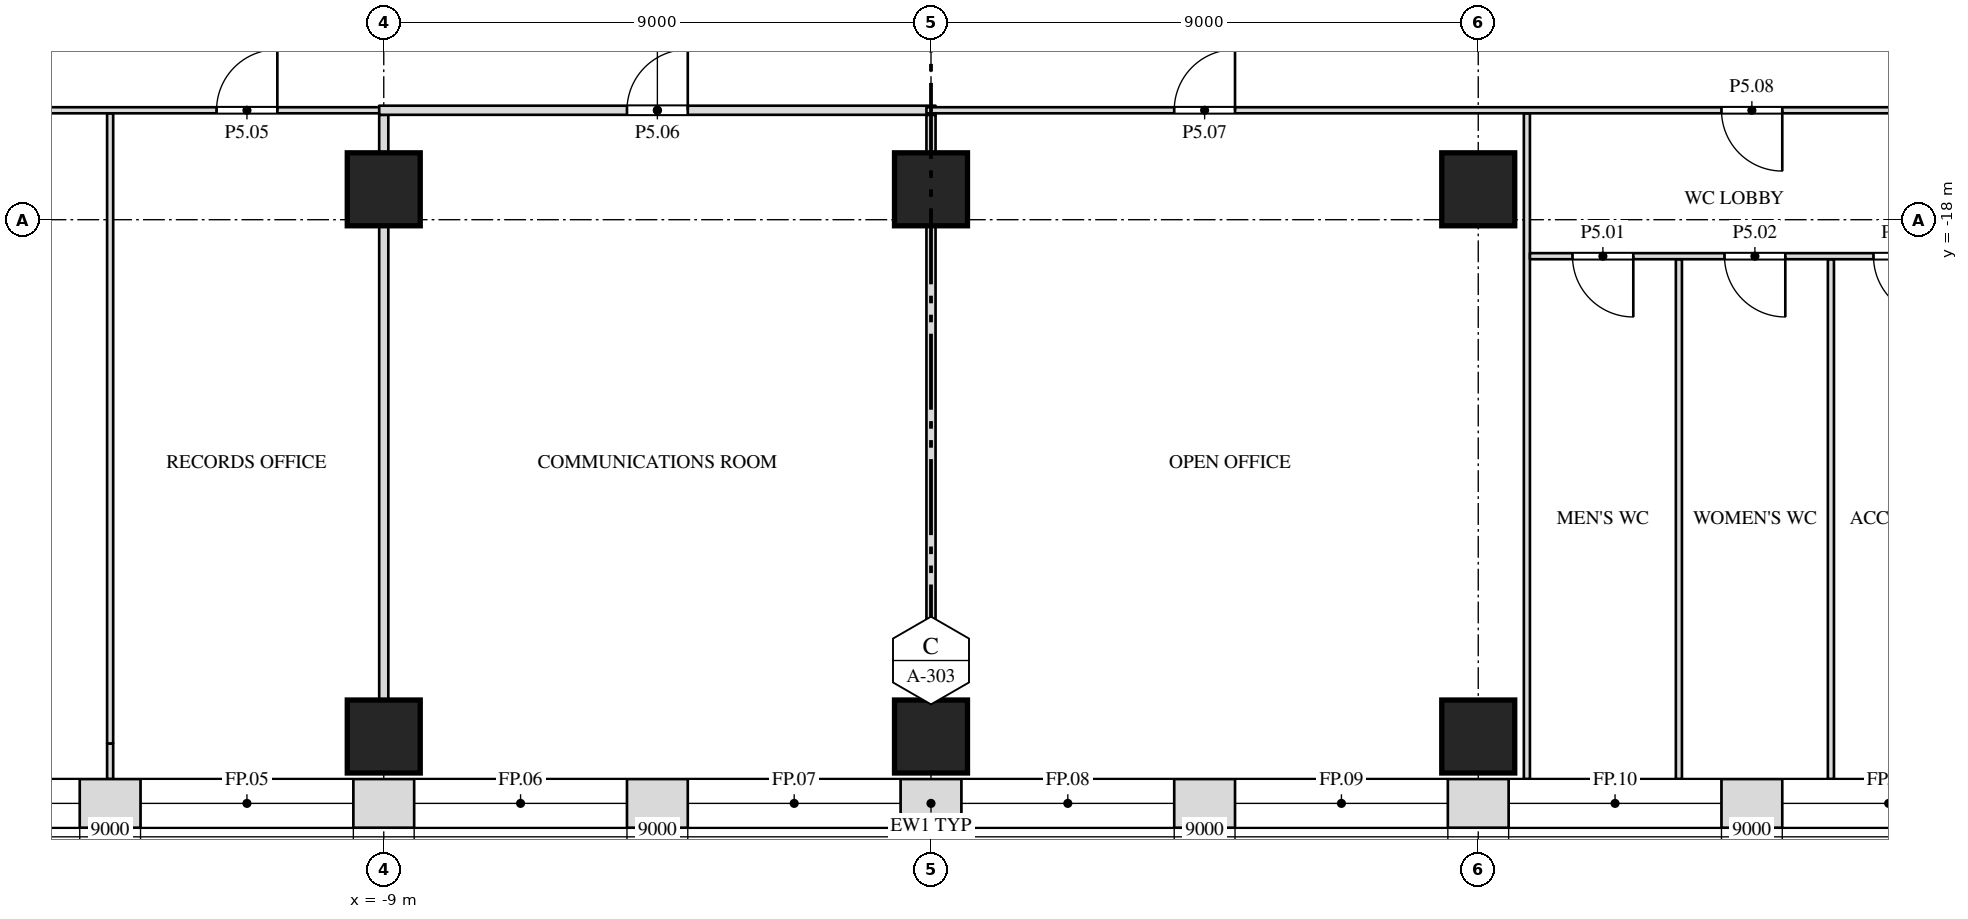
"""IFC4 building model, lengths in metres.
Left out: names, types, materials, properties, quantities, classifications, styles, units other than length and angle.
Written with IfcOpenShell. Run it as: python <this file> out.ifc"""

import sys

from ifc_helpers import new_model, si_unit, direction, frame, frame_2d, origin, origin_2d, place, context, subcontext, project, spatial, rectangle, extrude, element, fill, save


model = new_model("IFC4")
c1 = context("Model", 3, precision=1e-05, world=origin(), true_north=direction((0.0, 1.0)))
c2 = subcontext(c1, "Body", "Model", "MODEL_VIEW")
j1 = project(units=[si_unit("LENGTHUNIT", "METRE"), si_unit("PLANEANGLEUNIT", "RADIAN")], contexts=[c1])
p1 = place(None, origin())
s1 = spatial("IfcSite", under=j1, at=p1, CompositionType="ELEMENT")
p2 = place(p1, origin())
s2 = spatial("IfcBuilding", under=s1, at=p2, CompositionType="ELEMENT")
p3 = place(p2, frame((0.0, 0.0, 33.0)))
s3 = spatial("IfcBuildingStorey", under=s2, at=p3, CompositionType="ELEMENT", Elevation=33.0)
for number, where, z_axis, x_axis in (
    (1, (-9.0, -26.5, 0.0), (0.0, 0.0, 1.0), (1.0, 0.0, 0.0)),
    (2, (0.0, -26.5, 0.0), (0.0, 0.0, 1.0), (1.0, 0.0, 0.0)),
    (3, (9.0, -26.5, 0.0), (0.0, 0.0, 1.0), (1.0, 0.0, 0.0)),
    (4, (-9.0, -17.5, 0.0), (0.0, 0.0, 1.0), (1.0, 0.0, 0.0)),
    (5, (0.0, -17.5, 0.0), (0.0, 0.0, 1.0), (1.0, 0.0, 0.0)),
    (6, (9.0, -17.5, 0.0), (0.0, 0.0, 1.0), (1.0, 0.0, 0.0)),
):
    element("IfcColumn", number, at=place(p3, frame(where, z_axis=z_axis, x_axis=x_axis)), inside=s3, PredefinedType="COLUMN", context=c2, shape_type="SweptSolid", body=[
        extrude(rectangle(XDim=1.2, YDim=1.2, at=origin_2d()), origin(), (0.0, 0.0, 1.0), 6.0),
    ])
p4 = place(p3, frame((-13.5, -27.2, 0.0), z_axis=(0.0, 0.0, 1.0), x_axis=(0.0, 1.0, 0.0)))
e7 = element("IfcWall", 7, at=p4, inside=s3, PredefinedType="PARTITIONING", context=c2, shape_type="SweptSolid", body=[
    extrude(rectangle(XDim=0.585, YDim=0.1, at=frame_2d((0.293, 0.0))), origin(), (0.0, 0.0, 1.0), 5.75),
])
p5 = place(p3, frame((-13.5, -26.615, 0.0), z_axis=(0.0, 0.0, 1.0), x_axis=(0.0, 1.0, 0.0)))
e8 = element("IfcWall", 8, at=p5, inside=s3, PredefinedType="PARTITIONING", context=c2, shape_type="SweptSolid", body=[
    extrude(rectangle(XDim=10.365, YDim=0.1, at=frame_2d((5.182, 0.0))), origin(), (0.0, 0.0, 1.0), 5.138),
])
p6 = place(p3, frame((-9.0, -25.9, 0.0), z_axis=(0.0, 0.0, 1.0), x_axis=(0.0, 1.0, 0.0)))
e9 = element("IfcWall", 9, at=p6, inside=s3, PredefinedType="PARTITIONING", context=c2, shape_type="SweptSolid", body=[
    extrude(rectangle(XDim=7.8, YDim=0.15, at=frame_2d((3.9, 0.0))), origin(), (0.0, 0.0, 1.0), 5.138),
])
p7 = place(p3, frame((-9.0, -16.9, 0.0), z_axis=(0.0, 0.0, 1.0), x_axis=(0.0, 1.0, 0.0)))
e10 = element("IfcWall", 10, at=p7, inside=s3, PredefinedType="PARTITIONING", context=c2, shape_type="SweptSolid", body=[
    extrude(rectangle(XDim=0.625, YDim=0.15, at=frame_2d((0.312, 0.0))), origin(), (0.0, 0.0, 1.0), 5.75),
])
p8 = place(p3, frame((0.0, -25.9, 0.0), z_axis=(0.0, 0.0, 1.0), x_axis=(0.0, 1.0, 0.0)))
e11 = element("IfcWall", 11, at=p8, inside=s3, PredefinedType="PARTITIONING", context=c2, shape_type="SweptSolid", body=[
    extrude(rectangle(XDim=7.8, YDim=0.15, at=frame_2d((3.9, 0.0))), origin(), (0.0, 0.0, 1.0), 5.138),
])
p9 = place(p3, frame((0.0, -16.9, 0.0), z_axis=(0.0, 0.0, 1.0), x_axis=(0.0, 1.0, 0.0)))
e12 = element("IfcWall", 12, at=p9, inside=s3, PredefinedType="PARTITIONING", context=c2, shape_type="SweptSolid", body=[
    extrude(rectangle(XDim=0.625, YDim=0.15, at=frame_2d((0.312, 0.0))), origin(), (0.0, 0.0, 1.0), 5.75),
])
p10 = place(p3, frame((9.8, -27.2, 0.0), z_axis=(0.0, 0.0, 1.0), x_axis=(0.0, 1.0, 0.0)))
e13 = element("IfcWall", 13, at=p10, inside=s3, PredefinedType="PARTITIONING", context=c2, shape_type="SweptSolid", body=[
    extrude(rectangle(XDim=10.95, YDim=0.1, at=frame_2d((5.475, 0.0))), origin(), (0.0, 0.0, 1.0), 5.75),
])
for number, where, z_axis, x_axis in (
    (14, (12.3, -27.2, 0.0), (0.0, 0.0, 1.0), (0.0, 1.0, 0.0)),
    (15, (14.8, -27.2, 0.0), (0.0, 0.0, 1.0), (0.0, 1.0, 0.0)),
):
    element("IfcWall", number, at=place(p3, frame(where, z_axis=z_axis, x_axis=x_axis)), inside=s3, PredefinedType="PARTITIONING", context=c2, shape_type="SweptSolid", body=[
        extrude(rectangle(XDim=8.55, YDim=0.1, at=frame_2d((4.275, 0.0))), origin(), (0.0, 0.0, 1.0), 5.75),
    ])
p11 = place(p3, frame((9.85, -18.6, 0.0), z_axis=(0.0, 0.0, 1.0), x_axis=(1.0, 0.0, 0.0)))
e16 = element("IfcWall", 16, at=p11, inside=s3, PredefinedType="PARTITIONING", context=c2, shape_type="SweptSolid", body=[
    extrude(rectangle(XDim=7.25, YDim=0.1, at=frame_2d((3.625, 0.0))), origin(), (0.0, 0.0, 1.0), 5.75),
])
p12 = place(p11, frame((0.7, 0.0, 0.0)))
e17 = element("IfcOpeningElement", 17, at=p12, cuts=e16, PredefinedType="OPENING", context=c2, shape_type="SweptSolid", body=[
    extrude(rectangle(XDim=1.0, YDim=2.1, at=frame_2d((0.5, 1.05))), frame((0.0, 0.062, 0.0), z_axis=(0.0, -1.0, 0.0), x_axis=(1.0, 0.0, 0.0)), (0.0, 0.0, 1.0), 0.124),
])
p13 = place(p11, frame((3.2, 0.0, 0.0)))
e18 = element("IfcOpeningElement", 18, at=p13, cuts=e16, PredefinedType="OPENING", context=c2, shape_type="SweptSolid", body=[
    extrude(rectangle(XDim=1.0, YDim=2.1, at=frame_2d((0.5, 1.05))), frame((0.0, 0.062, 0.0), z_axis=(0.0, -1.0, 0.0), x_axis=(1.0, 0.0, 0.0)), (0.0, 0.0, 1.0), 0.124),
])
p14 = place(p11, frame((5.65, 0.0, 0.0)))
e19 = element("IfcOpeningElement", 19, at=p14, cuts=e16, PredefinedType="OPENING", context=c2, shape_type="SweptSolid", body=[
    extrude(rectangle(XDim=1.0, YDim=2.1, at=frame_2d((0.5, 1.05))), frame((0.0, 0.062, 0.0), z_axis=(0.0, -1.0, 0.0), x_axis=(1.0, 0.0, 0.0)), (0.0, 0.0, 1.0), 0.124),
])
p15 = place(p3, frame((-26.95, -16.2, 0.0), z_axis=(0.0, 0.0, 1.0), x_axis=(1.0, 0.0, 0.0)))
e20 = element("IfcWall", 20, at=p15, inside=s3, PredefinedType="PARTITIONING", context=c2, shape_type="SweptSolid", body=[
    extrude(rectangle(XDim=18.025, YDim=0.1, at=frame_2d((9.012, 0.0))), origin(), (0.0, 0.0, 1.0), 5.75),
])
p16 = place(p15, frame((6.2, 0.0, 0.0)))
e21 = element("IfcOpeningElement", 21, at=p16, cuts=e20, PredefinedType="OPENING", context=c2, shape_type="SweptSolid", body=[
    extrude(rectangle(XDim=1.0, YDim=2.1, at=frame_2d((0.5, 1.05))), frame((0.0, 0.062, 0.0), z_axis=(0.0, -1.0, 0.0), x_axis=(1.0, 0.0, 0.0)), (0.0, 0.0, 1.0), 0.124),
])
p17 = place(p15, frame((15.2, 0.0, 0.0)))
e22 = element("IfcOpeningElement", 22, at=p17, cuts=e20, PredefinedType="OPENING", context=c2, shape_type="SweptSolid", body=[
    extrude(rectangle(XDim=1.0, YDim=2.1, at=frame_2d((0.5, 1.05))), frame((0.0, 0.062, 0.0), z_axis=(0.0, -1.0, 0.0), x_axis=(1.0, 0.0, 0.0)), (0.0, 0.0, 1.0), 0.124),
])
p18 = place(p3, frame((-9.075, -16.2, 0.0), z_axis=(0.0, 0.0, 1.0), x_axis=(1.0, 0.0, 0.0)))
e23 = element("IfcWall", 23, at=p18, inside=s3, PredefinedType="PARTITIONING", context=c2, shape_type="SweptSolid", body=[
    extrude(rectangle(XDim=9.15, YDim=0.15, at=frame_2d((4.575, 0.0))), origin(), (0.0, 0.0, 1.0), 5.75),
])
p19 = place(p18, frame((4.075, 0.0, 0.0)))
e24 = element("IfcOpeningElement", 24, at=p19, cuts=e23, PredefinedType="OPENING", context=c2, shape_type="SweptSolid", body=[
    extrude(rectangle(XDim=1.0, YDim=2.1, at=frame_2d((0.5, 1.05))), frame((0.0, 0.087, 0.0), z_axis=(0.0, -1.0, 0.0), x_axis=(1.0, 0.0, 0.0)), (0.0, 0.0, 1.0), 0.174),
])
p20 = place(p3, frame((-0.075, -16.2, 0.0), z_axis=(0.0, 0.0, 1.0), x_axis=(1.0, 0.0, 0.0)))
e25 = element("IfcWall", 25, at=p20, inside=s3, PredefinedType="PARTITIONING", context=c2, shape_type="SweptSolid", body=[
    extrude(rectangle(XDim=17.375, YDim=0.1, at=frame_2d((8.688, 0.0))), origin(), (0.0, 0.0, 1.0), 5.75),
])
p21 = place(p20, frame((4.075, 0.0, 0.0)))
e26 = element("IfcOpeningElement", 26, at=p21, cuts=e25, PredefinedType="OPENING", context=c2, shape_type="SweptSolid", body=[
    extrude(rectangle(XDim=1.0, YDim=2.1, at=frame_2d((0.5, 1.05))), frame((0.0, 0.062, 0.0), z_axis=(0.0, -1.0, 0.0), x_axis=(1.0, 0.0, 0.0)), (0.0, 0.0, 1.0), 0.124),
])
p22 = place(p20, frame((13.075, 0.0, 0.0)))
e27 = element("IfcOpeningElement", 27, at=p22, cuts=e25, PredefinedType="OPENING", context=c2, shape_type="SweptSolid", body=[
    extrude(rectangle(XDim=1.0, YDim=2.1, at=frame_2d((0.5, 1.05))), frame((0.0, 0.062, 0.0), z_axis=(0.0, -1.0, 0.0), x_axis=(1.0, 0.0, 0.0)), (0.0, 0.0, 1.0), 0.124),
])
p23 = place(p3, frame((-32.948, -27.6, 0.0), z_axis=(0.0, 0.0, 1.0), x_axis=(1.0, 0.0, 0.0)))
e28 = element("IfcWall", 28, at=p23, inside=s3, PredefinedType="SOLIDWALL", context=c2, shape_type="SweptSolid", body=[
    extrude(rectangle(XDim=65.895, YDim=0.8, at=frame_2d((32.948, 0.0))), origin(), (0.0, 0.0, 1.0), 5.75),
])
p24 = place(p23, frame((1.948, 0.0, 1.0)))
e29 = element("IfcOpeningElement", 29, at=p24, cuts=e28, PredefinedType="OPENING", context=c2, shape_type="SweptSolid", body=[
    extrude(rectangle(XDim=3.5, YDim=4.0, at=frame_2d((1.75, 2.0))), frame((0.0, 0.412, 0.0), z_axis=(0.0, -1.0, 0.0), x_axis=(1.0, 0.0, 0.0)), (0.0, 0.0, 1.0), 0.824),
])
p25 = place(p23, frame((6.448, 0.0, 1.0)))
e30 = element("IfcOpeningElement", 30, at=p25, cuts=e28, PredefinedType="OPENING", context=c2, shape_type="SweptSolid", body=[
    extrude(rectangle(XDim=3.5, YDim=4.0, at=frame_2d((1.75, 2.0))), frame((0.0, 0.412, 0.0), z_axis=(0.0, -1.0, 0.0), x_axis=(1.0, 0.0, 0.0)), (0.0, 0.0, 1.0), 0.824),
])
p26 = place(p23, frame((10.948, 0.0, 1.0)))
e31 = element("IfcOpeningElement", 31, at=p26, cuts=e28, PredefinedType="OPENING", context=c2, shape_type="SweptSolid", body=[
    extrude(rectangle(XDim=3.5, YDim=4.0, at=frame_2d((1.75, 2.0))), frame((0.0, 0.412, 0.0), z_axis=(0.0, -1.0, 0.0), x_axis=(1.0, 0.0, 0.0)), (0.0, 0.0, 1.0), 0.824),
])
p27 = place(p23, frame((15.448, 0.0, 1.0)))
e32 = element("IfcOpeningElement", 32, at=p27, cuts=e28, PredefinedType="OPENING", context=c2, shape_type="SweptSolid", body=[
    extrude(rectangle(XDim=3.5, YDim=4.0, at=frame_2d((1.75, 2.0))), frame((0.0, 0.412, 0.0), z_axis=(0.0, -1.0, 0.0), x_axis=(1.0, 0.0, 0.0)), (0.0, 0.0, 1.0), 0.824),
])
p28 = place(p23, frame((19.948, 0.0, 1.0)))
e33 = element("IfcOpeningElement", 33, at=p28, cuts=e28, PredefinedType="OPENING", context=c2, shape_type="SweptSolid", body=[
    extrude(rectangle(XDim=3.5, YDim=4.0, at=frame_2d((1.75, 2.0))), frame((0.0, 0.412, 0.0), z_axis=(0.0, -1.0, 0.0), x_axis=(1.0, 0.0, 0.0)), (0.0, 0.0, 1.0), 0.824),
])
p29 = place(p23, frame((24.448, 0.0, 1.0)))
e34 = element("IfcOpeningElement", 34, at=p29, cuts=e28, PredefinedType="OPENING", context=c2, shape_type="SweptSolid", body=[
    extrude(rectangle(XDim=3.5, YDim=4.0, at=frame_2d((1.75, 2.0))), frame((0.0, 0.412, 0.0), z_axis=(0.0, -1.0, 0.0), x_axis=(1.0, 0.0, 0.0)), (0.0, 0.0, 1.0), 0.824),
])
p30 = place(p23, frame((28.948, 0.0, 1.0)))
e35 = element("IfcOpeningElement", 35, at=p30, cuts=e28, PredefinedType="OPENING", context=c2, shape_type="SweptSolid", body=[
    extrude(rectangle(XDim=3.5, YDim=4.0, at=frame_2d((1.75, 2.0))), frame((0.0, 0.412, 0.0), z_axis=(0.0, -1.0, 0.0), x_axis=(1.0, 0.0, 0.0)), (0.0, 0.0, 1.0), 0.824),
])
p31 = place(p23, frame((33.448, 0.0, 1.0)))
e36 = element("IfcOpeningElement", 36, at=p31, cuts=e28, PredefinedType="OPENING", context=c2, shape_type="SweptSolid", body=[
    extrude(rectangle(XDim=3.5, YDim=4.0, at=frame_2d((1.75, 2.0))), frame((0.0, 0.412, 0.0), z_axis=(0.0, -1.0, 0.0), x_axis=(1.0, 0.0, 0.0)), (0.0, 0.0, 1.0), 0.824),
])
p32 = place(p23, frame((37.948, 0.0, 1.0)))
e37 = element("IfcOpeningElement", 37, at=p32, cuts=e28, PredefinedType="OPENING", context=c2, shape_type="SweptSolid", body=[
    extrude(rectangle(XDim=3.5, YDim=4.0, at=frame_2d((1.75, 2.0))), frame((0.0, 0.412, 0.0), z_axis=(0.0, -1.0, 0.0), x_axis=(1.0, 0.0, 0.0)), (0.0, 0.0, 1.0), 0.824),
])
p33 = place(p23, frame((42.448, 0.0, 1.0)))
e38 = element("IfcOpeningElement", 38, at=p33, cuts=e28, PredefinedType="OPENING", context=c2, shape_type="SweptSolid", body=[
    extrude(rectangle(XDim=3.5, YDim=4.0, at=frame_2d((1.75, 2.0))), frame((0.0, 0.412, 0.0), z_axis=(0.0, -1.0, 0.0), x_axis=(1.0, 0.0, 0.0)), (0.0, 0.0, 1.0), 0.824),
])
p34 = place(p23, frame((46.948, 0.0, 1.0)))
e39 = element("IfcOpeningElement", 39, at=p34, cuts=e28, PredefinedType="OPENING", context=c2, shape_type="SweptSolid", body=[
    extrude(rectangle(XDim=3.5, YDim=4.0, at=frame_2d((1.75, 2.0))), frame((0.0, 0.412, 0.0), z_axis=(0.0, -1.0, 0.0), x_axis=(1.0, 0.0, 0.0)), (0.0, 0.0, 1.0), 0.824),
])
p35 = place(p23, frame((51.448, 0.0, 1.0)))
e40 = element("IfcOpeningElement", 40, at=p35, cuts=e28, PredefinedType="OPENING", context=c2, shape_type="SweptSolid", body=[
    extrude(rectangle(XDim=3.5, YDim=4.0, at=frame_2d((1.75, 2.0))), frame((0.0, 0.412, 0.0), z_axis=(0.0, -1.0, 0.0), x_axis=(1.0, 0.0, 0.0)), (0.0, 0.0, 1.0), 0.824),
])
p36 = place(p23, frame((55.948, 0.0, 1.0)))
e41 = element("IfcOpeningElement", 41, at=p36, cuts=e28, PredefinedType="OPENING", context=c2, shape_type="SweptSolid", body=[
    extrude(rectangle(XDim=3.5, YDim=4.0, at=frame_2d((1.75, 2.0))), frame((0.0, 0.412, 0.0), z_axis=(0.0, -1.0, 0.0), x_axis=(1.0, 0.0, 0.0)), (0.0, 0.0, 1.0), 0.824),
])
p37 = place(p23, frame((60.448, 0.0, 1.0)))
e42 = element("IfcOpeningElement", 42, at=p37, cuts=e28, PredefinedType="OPENING", context=c2, shape_type="SweptSolid", body=[
    extrude(rectangle(XDim=3.5, YDim=4.0, at=frame_2d((1.75, 2.0))), frame((0.0, 0.412, 0.0), z_axis=(0.0, -1.0, 0.0), x_axis=(1.0, 0.0, 0.0)), (0.0, 0.0, 1.0), 0.824),
])
p38 = place(p12, origin())
e43 = element("IfcDoor", 43, at=p38, inside=s3, OperationType="SINGLE_SWING_LEFT", PredefinedType="DOOR", context=c2, shape_type="SweptSolid", body=[
    extrude(rectangle(XDim=1.0, YDim=2.1, at=frame_2d((0.5, 1.05))), frame((0.0, 0.025, 0.0), z_axis=(0.0, -1.0, 0.0), x_axis=(1.0, 0.0, 0.0)), (0.0, 0.0, 1.0), 0.05),
])
fill(e17, e43)
p39 = place(p13, origin())
e44 = element("IfcDoor", 44, at=p39, inside=s3, OperationType="SINGLE_SWING_LEFT", PredefinedType="DOOR", context=c2, shape_type="SweptSolid", body=[
    extrude(rectangle(XDim=1.0, YDim=2.1, at=frame_2d((0.5, 1.05))), frame((0.0, 0.025, 0.0), z_axis=(0.0, -1.0, 0.0), x_axis=(1.0, 0.0, 0.0)), (0.0, 0.0, 1.0), 0.05),
])
fill(e18, e44)
p40 = place(p14, origin())
e45 = element("IfcDoor", 45, at=p40, inside=s3, OperationType="SINGLE_SWING_LEFT", PredefinedType="DOOR", context=c2, shape_type="SweptSolid", body=[
    extrude(rectangle(XDim=1.0, YDim=2.1, at=frame_2d((0.5, 1.05))), frame((0.0, 0.025, 0.0), z_axis=(0.0, -1.0, 0.0), x_axis=(1.0, 0.0, 0.0)), (0.0, 0.0, 1.0), 0.05),
])
fill(e19, e45)
p41 = place(p17, origin())
e46 = element("IfcDoor", 46, at=p41, inside=s3, OperationType="SINGLE_SWING_RIGHT", PredefinedType="DOOR", context=c2, shape_type="SweptSolid", body=[
    extrude(rectangle(XDim=1.0, YDim=2.1, at=frame_2d((0.5, 1.05))), frame((0.0, 0.025, 0.0), z_axis=(0.0, -1.0, 0.0), x_axis=(1.0, 0.0, 0.0)), (0.0, 0.0, 1.0), 0.05),
])
fill(e22, e46)
p42 = place(p19, origin())
e47 = element("IfcDoor", 47, at=p42, inside=s3, OperationType="SINGLE_SWING_RIGHT", PredefinedType="DOOR", context=c2, shape_type="SweptSolid", body=[
    extrude(rectangle(XDim=1.0, YDim=2.1, at=frame_2d((0.5, 1.05))), frame((0.0, 0.025, 0.0), z_axis=(0.0, -1.0, 0.0), x_axis=(1.0, 0.0, 0.0)), (0.0, 0.0, 1.0), 0.05),
])
fill(e24, e47)
p43 = place(p21, origin())
e48 = element("IfcDoor", 48, at=p43, inside=s3, OperationType="SINGLE_SWING_RIGHT", PredefinedType="DOOR", context=c2, shape_type="SweptSolid", body=[
    extrude(rectangle(XDim=1.0, YDim=2.1, at=frame_2d((0.5, 1.05))), frame((0.0, 0.025, 0.0), z_axis=(0.0, -1.0, 0.0), x_axis=(1.0, 0.0, 0.0)), (0.0, 0.0, 1.0), 0.05),
])
fill(e26, e48)
p44 = place(p22, origin())
e49 = element("IfcDoor", 49, at=p44, inside=s3, OperationType="SINGLE_SWING_LEFT", PredefinedType="DOOR", context=c2, shape_type="SweptSolid", body=[
    extrude(rectangle(XDim=1.0, YDim=2.1, at=frame_2d((0.5, 1.05))), frame((0.0, 0.025, 0.0), z_axis=(0.0, -1.0, 0.0), x_axis=(1.0, 0.0, 0.0)), (0.0, 0.0, 1.0), 0.05),
])
fill(e27, e49)
p45 = place(p27, origin())
e50 = element("IfcWindow", 50, at=p45, inside=s3, PartitioningType="SINGLE_PANEL", PredefinedType="WINDOW", context=c2, shape_type="SweptSolid", body=[
    extrude(rectangle(XDim=3.5, YDim=4.0, at=frame_2d((1.75, 2.0))), frame((0.0, 0.03, 0.0), z_axis=(0.0, -1.0, 0.0), x_axis=(1.0, 0.0, 0.0)), (0.0, 0.0, 1.0), 0.06),
])
fill(e32, e50)
p46 = place(p28, origin())
e51 = element("IfcWindow", 51, at=p46, inside=s3, PartitioningType="SINGLE_PANEL", PredefinedType="WINDOW", context=c2, shape_type="SweptSolid", body=[
    extrude(rectangle(XDim=3.5, YDim=4.0, at=frame_2d((1.75, 2.0))), frame((0.0, 0.03, 0.0), z_axis=(0.0, -1.0, 0.0), x_axis=(1.0, 0.0, 0.0)), (0.0, 0.0, 1.0), 0.06),
])
fill(e33, e51)
p47 = place(p29, origin())
e52 = element("IfcWindow", 52, at=p47, inside=s3, PartitioningType="SINGLE_PANEL", PredefinedType="WINDOW", context=c2, shape_type="SweptSolid", body=[
    extrude(rectangle(XDim=3.5, YDim=4.0, at=frame_2d((1.75, 2.0))), frame((0.0, 0.03, 0.0), z_axis=(0.0, -1.0, 0.0), x_axis=(1.0, 0.0, 0.0)), (0.0, 0.0, 1.0), 0.06),
])
fill(e34, e52)
p48 = place(p30, origin())
e53 = element("IfcWindow", 53, at=p48, inside=s3, PartitioningType="SINGLE_PANEL", PredefinedType="WINDOW", context=c2, shape_type="SweptSolid", body=[
    extrude(rectangle(XDim=3.5, YDim=4.0, at=frame_2d((1.75, 2.0))), frame((0.0, 0.03, 0.0), z_axis=(0.0, -1.0, 0.0), x_axis=(1.0, 0.0, 0.0)), (0.0, 0.0, 1.0), 0.06),
])
fill(e35, e53)
p49 = place(p31, origin())
e54 = element("IfcWindow", 54, at=p49, inside=s3, PartitioningType="SINGLE_PANEL", PredefinedType="WINDOW", context=c2, shape_type="SweptSolid", body=[
    extrude(rectangle(XDim=3.5, YDim=4.0, at=frame_2d((1.75, 2.0))), frame((0.0, 0.03, 0.0), z_axis=(0.0, -1.0, 0.0), x_axis=(1.0, 0.0, 0.0)), (0.0, 0.0, 1.0), 0.06),
])
fill(e36, e54)
p50 = place(p32, origin())
e55 = element("IfcWindow", 55, at=p50, inside=s3, PartitioningType="SINGLE_PANEL", PredefinedType="WINDOW", context=c2, shape_type="SweptSolid", body=[
    extrude(rectangle(XDim=3.5, YDim=4.0, at=frame_2d((1.75, 2.0))), frame((0.0, 0.03, 0.0), z_axis=(0.0, -1.0, 0.0), x_axis=(1.0, 0.0, 0.0)), (0.0, 0.0, 1.0), 0.06),
])
fill(e37, e55)
p51 = place(p33, origin())
e56 = element("IfcWindow", 56, at=p51, inside=s3, PartitioningType="SINGLE_PANEL", PredefinedType="WINDOW", context=c2, shape_type="SweptSolid", body=[
    extrude(rectangle(XDim=3.5, YDim=4.0, at=frame_2d((1.75, 2.0))), frame((0.0, 0.03, 0.0), z_axis=(0.0, -1.0, 0.0), x_axis=(1.0, 0.0, 0.0)), (0.0, 0.0, 1.0), 0.06),
])
fill(e38, e56)
p52 = place(p34, origin())
e57 = element("IfcWindow", 57, at=p52, inside=s3, PartitioningType="SINGLE_PANEL", PredefinedType="WINDOW", context=c2, shape_type="SweptSolid", body=[
    extrude(rectangle(XDim=3.5, YDim=4.0, at=frame_2d((1.75, 2.0))), frame((0.0, 0.03, 0.0), z_axis=(0.0, -1.0, 0.0), x_axis=(1.0, 0.0, 0.0)), (0.0, 0.0, 1.0), 0.06),
])
fill(e39, e57)
save(model, sys.argv[1])
